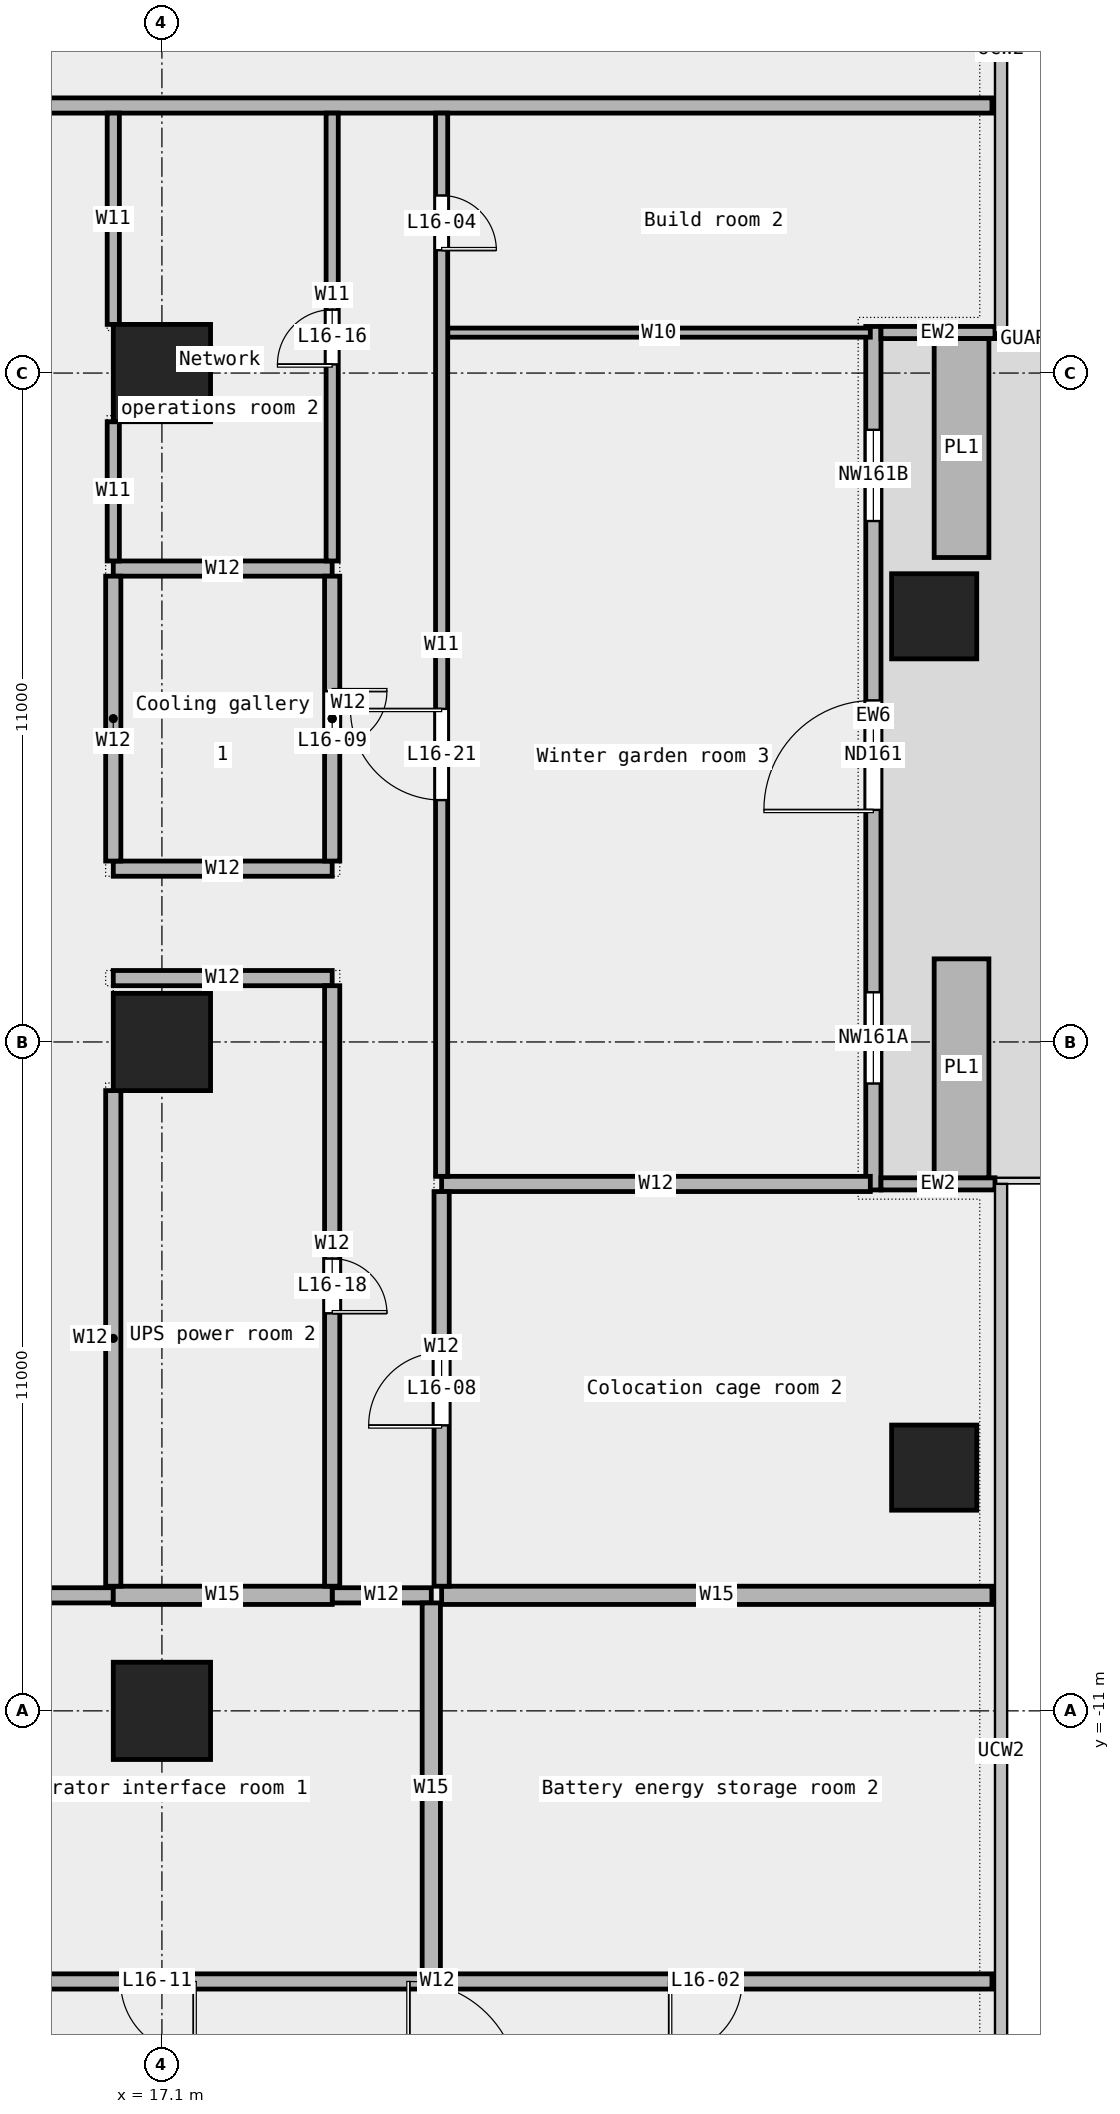
"""IFC4 building model, lengths in metres.
Left out: names, types, materials, properties, quantities, classifications, styles, units other than length and angle.
Written with IfcOpenShell. Run it as: python <this file> out.ifc"""

import sys

from ifc_helpers import new_model, si_unit, direction, frame, frame_2d, origin, origin_2d, place, context, subcontext, project, spatial, rectangle, extrude, element, fill, save


model = new_model("IFC4")
c1 = context("Model", 3, precision=1e-05, world=origin(), true_north=direction((0.0, 1.0)))
c2 = subcontext(c1, "Body", "Model", "MODEL_VIEW")
j1 = project(units=[si_unit("LENGTHUNIT", "METRE"), si_unit("PLANEANGLEUNIT", "RADIAN")], contexts=[c1])
p1 = place(None, origin())
s1 = spatial("IfcSite", under=j1, at=p1, CompositionType="ELEMENT")
p2 = place(p1, origin())
s2 = spatial("IfcBuilding", under=s1, at=p2, CompositionType="ELEMENT")
p3 = place(p2, frame((0.0, 0.0, 83.8)))
s3 = spatial("IfcBuildingStorey", under=s2, at=p3, CompositionType="ELEMENT", Elevation=83.8)
for number, where, z_axis, x_axis in (
    (1, (29.8, -7.0, 0.0), (0.0, 0.0, 1.0), (1.0, 0.0, 0.0)),
    (2, (29.8, 7.0, 0.0), (0.0, 0.0, 1.0), (1.0, 0.0, 0.0)),
):
    element("IfcColumn", number, at=place(p3, frame(where, z_axis=z_axis, x_axis=x_axis)), inside=s3, PredefinedType="COLUMN", context=c2, shape_type="SweptSolid", body=[
        extrude(rectangle(XDim=1.4, YDim=1.4, at=origin_2d()), origin(), (0.0, 0.0, 1.0), 4.2),
    ])
for number, where, z_axis, x_axis in (
    (3, (17.1, -11.0, 0.0), (0.0, 0.0, 1.0), (1.0, 0.0, 0.0)),
    (4, (17.1, 0.0, 0.0), (0.0, 0.0, 1.0), (1.0, 0.0, 0.0)),
    (5, (17.1, 11.0, 0.0), (0.0, 0.0, 1.0), (1.0, 0.0, 0.0)),
):
    element("IfcColumn", number, at=place(p3, frame(where, z_axis=z_axis, x_axis=x_axis)), inside=s3, PredefinedType="COLUMN", context=c2, shape_type="SweptSolid", body=[
        extrude(rectangle(XDim=1.6, YDim=1.6, at=origin_2d()), origin(), (0.0, 0.0, 1.0), 4.2),
    ])
p4 = place(p3, frame((28.8, -2.433, 0.0), z_axis=(0.0, 0.0, 1.0), x_axis=(0.0, 1.0, 0.0)))
e6 = element("IfcWall", 6, at=p4, inside=s3, PredefinedType="STANDARD", context=c2, shape_type="SweptSolid", body=[
    extrude(rectangle(XDim=14.2, YDim=0.25, at=frame_2d((7.1, 0.0))), origin(), (0.0, 0.0, 1.0), 4.2),
])
p5 = place(p4, frame((1.75, 0.0, 0.45)))
e7 = element("IfcOpeningElement", 7, at=p5, cuts=e6, PredefinedType="OPENING", context=c2, shape_type="SweptSolid", body=[
    extrude(rectangle(XDim=1.5, YDim=3.0, at=frame_2d((0.75, 1.5))), frame((0.0, 0.137, 0.0), z_axis=(0.0, -1.0, 0.0), x_axis=(1.0, 0.0, 0.0)), (0.0, 0.0, 1.0), 0.274),
])
p6 = place(p4, frame((6.25, 0.0, 0.0)))
e8 = element("IfcOpeningElement", 8, at=p6, cuts=e6, PredefinedType="OPENING", context=c2, shape_type="SweptSolid", body=[
    extrude(rectangle(XDim=1.8, YDim=2.4, at=frame_2d((0.9, 1.2))), frame((0.0, 0.137, 0.0), z_axis=(0.0, -1.0, 0.0), x_axis=(1.0, 0.0, 0.0)), (0.0, 0.0, 1.0), 0.274),
])
p7 = place(p4, frame((11.0, 0.0, 0.45)))
e9 = element("IfcOpeningElement", 9, at=p7, cuts=e6, PredefinedType="OPENING", context=c2, shape_type="SweptSolid", body=[
    extrude(rectangle(XDim=1.5, YDim=3.0, at=frame_2d((0.75, 1.5))), frame((0.0, 0.137, 0.0), z_axis=(0.0, -1.0, 0.0), x_axis=(1.0, 0.0, 0.0)), (0.0, 0.0, 1.0), 0.274),
])
for number, where, z_axis, x_axis in (
    (10, (30.8, -2.333, 0.0), (0.0, 0.0, 1.0), (-1.0, 0.0, 0.0)),
    (11, (30.8, 11.667, 0.0), (0.0, 0.0, 1.0), (-1.0, 0.0, 0.0)),
):
    element("IfcWall", number, at=place(p3, frame(where, z_axis=z_axis, x_axis=x_axis)), inside=s3, PredefinedType="STANDARD", context=c2, shape_type="SweptSolid", body=[
        extrude(rectangle(XDim=1.875, YDim=0.2, at=frame_2d((0.938, 0.0))), origin(), (0.0, 0.0, 1.0), 4.2),
    ])
for number, where, z_axis, x_axis in (
    (12, (30.25, -2.233, 0.0), (0.0, 0.0, 1.0), (0.0, 1.0, 0.0)),
    (13, (30.25, 7.967, 0.0), (0.0, 0.0, 1.0), (0.0, 1.0, 0.0)),
):
    element("IfcWall", number, at=place(p3, frame(where, z_axis=z_axis, x_axis=x_axis)), inside=s3, PredefinedType="STANDARD", context=c2, shape_type="SweptSolid", body=[
        extrude(rectangle(XDim=3.6, YDim=0.9, at=frame_2d((1.8, 0.0))), origin(), (0.0, 0.0, 1.0), 0.7),
    ])
p8 = place(p3, frame((12.51, -15.45, 0.0), z_axis=(0.0, 0.0, 1.0), x_axis=(1.0, 0.0, 0.0)))
e14 = element("IfcWall", 14, at=p8, inside=s3, PredefinedType="PARTITIONING", context=c2, shape_type="SweptSolid", body=[
    extrude(rectangle(XDim=18.24, YDim=0.25, at=frame_2d((9.12, 0.0))), origin(), (0.0, 0.0, 1.0), 4.2),
])
p9 = place(p8, frame((12.93, 0.0, 0.0)))
e15 = element("IfcOpeningElement", 15, at=p9, cuts=e14, PredefinedType="OPENING", context=c2, shape_type="SweptSolid", body=[
    extrude(rectangle(XDim=1.2, YDim=2.1, at=frame_2d((0.6, 1.05))), frame((0.0, 0.137, 0.0), z_axis=(0.0, -1.0, 0.0), x_axis=(1.0, 0.0, 0.0)), (0.0, 0.0, 1.0), 0.274),
])
p10 = place(p8, frame((3.91, 0.0, 0.0)))
e16 = element("IfcOpeningElement", 16, at=p10, cuts=e14, PredefinedType="OPENING", context=c2, shape_type="SweptSolid", body=[
    extrude(rectangle(XDim=1.2, YDim=2.1, at=frame_2d((0.6, 1.05))), frame((0.0, 0.137, 0.0), z_axis=(0.0, -1.0, 0.0), x_axis=(1.0, 0.0, 0.0)), (0.0, 0.0, 1.0), 0.274),
])
p11 = place(p3, frame((12.51, -9.1, 0.0), z_axis=(0.0, 0.0, 1.0), x_axis=(1.0, 0.0, 0.0)))
e17 = element("IfcWall", 17, at=p11, inside=s3, PredefinedType="PARTITIONING", context=c2, shape_type="SweptSolid", body=[
    extrude(rectangle(XDim=3.79, YDim=0.25, at=frame_2d((1.895, 0.0))), origin(), (0.0, 0.0, 1.0), 4.2),
])
p12 = place(p3, frame((19.9, -9.1, 0.0), z_axis=(0.0, 0.0, 1.0), x_axis=(1.0, 0.0, 0.0)))
e18 = element("IfcWall", 18, at=p12, inside=s3, PredefinedType="PARTITIONING", context=c2, shape_type="SweptSolid", body=[
    extrude(rectangle(XDim=1.63, YDim=0.25, at=frame_2d((0.815, 0.0))), origin(), (0.0, 0.0, 1.0), 4.2),
])
p13 = place(p3, frame((16.3, -9.1, 0.0), z_axis=(0.0, 0.0, 1.0), x_axis=(1.0, 0.0, 0.0)))
e19 = element("IfcWall", 19, at=p13, inside=s3, PredefinedType="PARTITIONING", context=c2, shape_type="SweptSolid", body=[
    extrude(rectangle(XDim=3.6, YDim=0.3, at=frame_2d((1.8, 0.0))), origin(), (0.0, 0.0, 1.0), 4.2),
])
p14 = place(p3, frame((21.7, -9.1, 0.0), z_axis=(0.0, 0.0, 1.0), x_axis=(1.0, 0.0, 0.0)))
e20 = element("IfcWall", 20, at=p14, inside=s3, PredefinedType="PARTITIONING", context=c2, shape_type="SweptSolid", body=[
    extrude(rectangle(XDim=9.05, YDim=0.3, at=frame_2d((4.525, 0.0))), origin(), (0.0, 0.0, 1.0), 4.2),
])
p15 = place(p3, frame((21.7, -2.335, 0.0), z_axis=(0.0, 0.0, 1.0), x_axis=(1.0, 0.0, 0.0)))
e21 = element("IfcWall", 21, at=p15, inside=s3, PredefinedType="PARTITIONING", context=c2, shape_type="SweptSolid", body=[
    extrude(rectangle(XDim=7.05, YDim=0.25, at=frame_2d((3.525, 0.0))), origin(), (0.0, 0.0, 1.0), 4.2),
])
for number, where, z_axis, x_axis in (
    (22, (16.3, 1.05, 0.0), (0.0, 0.0, 1.0), (1.0, 0.0, 0.0)),
    (23, (16.3, 2.85, 0.0), (0.0, 0.0, 1.0), (1.0, 0.0, 0.0)),
    (24, (16.3, 7.785, 0.0), (0.0, 0.0, 1.0), (1.0, 0.0, 0.0)),
):
    element("IfcWall", number, at=place(p3, frame(where, z_axis=z_axis, x_axis=x_axis)), inside=s3, PredefinedType="PARTITIONING", context=c2, shape_type="SweptSolid", body=[
        extrude(rectangle(XDim=3.6, YDim=0.25, at=frame_2d((1.8, 0.0))), origin(), (0.0, 0.0, 1.0), 4.2),
    ])
p16 = place(p3, frame((21.8, 11.665, 0.0), z_axis=(0.0, 0.0, 1.0), x_axis=(1.0, 0.0, 0.0)))
e25 = element("IfcWall", 25, at=p16, inside=s3, PredefinedType="PARTITIONING", context=c2, shape_type="SweptSolid", body=[
    extrude(rectangle(XDim=6.95, YDim=0.15, at=frame_2d((3.475, 0.0))), origin(), (0.0, 0.0, 1.0), 4.2),
])
p17 = place(p3, frame((-2.255, 15.4, 0.0), z_axis=(0.0, 0.0, 1.0), x_axis=(1.0, 0.0, 0.0)))
e26 = element("IfcWall", 26, at=p17, inside=s3, PredefinedType="PARTITIONING", context=c2, shape_type="SweptSolid", body=[
    extrude(rectangle(XDim=33.005, YDim=0.25, at=frame_2d((16.502, 0.0))), origin(), (0.0, 0.0, 1.0), 4.2),
])
p18 = place(p17, frame((11.498, 0.0, 0.0)))
e27 = element("IfcOpeningElement", 27, at=p18, cuts=e26, PredefinedType="OPENING", context=c2, shape_type="SweptSolid", body=[
    extrude(rectangle(XDim=1.8, YDim=2.1, at=frame_2d((0.9, 1.05))), frame((0.0, 0.137, 0.0), z_axis=(0.0, -1.0, 0.0), x_axis=(1.0, 0.0, 0.0)), (0.0, 0.0, 1.0), 0.274),
])
p19 = place(p17, frame((2.52, 0.0, 0.0)))
e28 = element("IfcOpeningElement", 28, at=p19, cuts=e26, PredefinedType="OPENING", context=c2, shape_type="SweptSolid", body=[
    extrude(rectangle(XDim=1.2, YDim=2.1, at=frame_2d((0.6, 1.05))), frame((0.0, 0.137, 0.0), z_axis=(0.0, -1.0, 0.0), x_axis=(1.0, 0.0, 0.0)), (0.0, 0.0, 1.0), 0.274),
])
p20 = place(p3, frame((16.3, 7.91, 0.0), z_axis=(0.0, 0.0, 1.0), x_axis=(0.0, 1.0, 0.0)))
e29 = element("IfcWall", 29, at=p20, inside=s3, PredefinedType="PARTITIONING", context=c2, shape_type="SweptSolid", body=[
    extrude(rectangle(XDim=2.29, YDim=0.2, at=frame_2d((1.145, 0.0))), origin(), (0.0, 0.0, 1.0), 4.2),
])
p21 = place(p3, frame((16.3, 11.8, 0.0), z_axis=(0.0, 0.0, 1.0), x_axis=(0.0, 1.0, 0.0)))
e30 = element("IfcWall", 30, at=p21, inside=s3, PredefinedType="PARTITIONING", context=c2, shape_type="SweptSolid", body=[
    extrude(rectangle(XDim=3.475, YDim=0.2, at=frame_2d((1.737, 0.0))), origin(), (0.0, 0.0, 1.0), 4.2),
])
p22 = place(p3, frame((16.3, -8.95, 0.0), z_axis=(0.0, 0.0, 1.0), x_axis=(0.0, 1.0, 0.0)))
e31 = element("IfcWall", 31, at=p22, inside=s3, PredefinedType="PARTITIONING", context=c2, shape_type="SweptSolid", body=[
    extrude(rectangle(XDim=8.15, YDim=0.25, at=frame_2d((4.075, 0.0))), origin(), (0.0, 0.0, 1.0), 4.2),
])
p23 = place(p3, frame((16.3, 2.975, 0.0), z_axis=(0.0, 0.0, 1.0), x_axis=(0.0, 1.0, 0.0)))
e32 = element("IfcWall", 32, at=p23, inside=s3, PredefinedType="PARTITIONING", context=c2, shape_type="SweptSolid", body=[
    extrude(rectangle(XDim=4.685, YDim=0.25, at=frame_2d((2.342, 0.0))), origin(), (0.0, 0.0, 1.0), 4.2),
])
p24 = place(p3, frame((19.9, 7.91, 0.0), z_axis=(0.0, 0.0, 1.0), x_axis=(0.0, 1.0, 0.0)))
e33 = element("IfcWall", 33, at=p24, inside=s3, PredefinedType="PARTITIONING", context=c2, shape_type="SweptSolid", body=[
    extrude(rectangle(XDim=7.365, YDim=0.2, at=frame_2d((3.683, 0.0))), origin(), (0.0, 0.0, 1.0), 4.2),
])
p25 = place(p24, frame((3.232, 0.0, 0.0)))
e34 = element("IfcOpeningElement", 34, at=p25, cuts=e33, PredefinedType="OPENING", context=c2, shape_type="SweptSolid", body=[
    extrude(rectangle(XDim=0.9, YDim=2.1, at=frame_2d((0.45, 1.05))), frame((0.0, 0.112, 0.0), z_axis=(0.0, -1.0, 0.0), x_axis=(1.0, 0.0, 0.0)), (0.0, 0.0, 1.0), 0.224),
])
p26 = place(p3, frame((19.9, -8.95, 0.0), z_axis=(0.0, 0.0, 1.0), x_axis=(0.0, 1.0, 0.0)))
e35 = element("IfcWall", 35, at=p26, inside=s3, PredefinedType="PARTITIONING", context=c2, shape_type="SweptSolid", body=[
    extrude(rectangle(XDim=9.875, YDim=0.25, at=frame_2d((4.938, 0.0))), origin(), (0.0, 0.0, 1.0), 4.2),
])
p27 = place(p26, frame((4.488, 0.0, 0.0)))
e36 = element("IfcOpeningElement", 36, at=p27, cuts=e35, PredefinedType="OPENING", context=c2, shape_type="SweptSolid", body=[
    extrude(rectangle(XDim=0.9, YDim=2.1, at=frame_2d((0.45, 1.05))), frame((0.0, 0.137, 0.0), z_axis=(0.0, -1.0, 0.0), x_axis=(1.0, 0.0, 0.0)), (0.0, 0.0, 1.0), 0.274),
])
p28 = place(p3, frame((19.9, 2.975, 0.0), z_axis=(0.0, 0.0, 1.0), x_axis=(0.0, 1.0, 0.0)))
e37 = element("IfcWall", 37, at=p28, inside=s3, PredefinedType="PARTITIONING", context=c2, shape_type="SweptSolid", body=[
    extrude(rectangle(XDim=4.685, YDim=0.25, at=frame_2d((2.342, 0.0))), origin(), (0.0, 0.0, 1.0), 4.2),
])
p29 = place(p28, frame((1.893, 0.0, 0.0)))
e38 = element("IfcOpeningElement", 38, at=p29, cuts=e37, PredefinedType="OPENING", context=c2, shape_type="SweptSolid", body=[
    extrude(rectangle(XDim=0.9, YDim=2.1, at=frame_2d((0.45, 1.05))), frame((0.0, 0.137, 0.0), z_axis=(0.0, -1.0, 0.0), x_axis=(1.0, 0.0, 0.0)), (0.0, 0.0, 1.0), 0.274),
])
p30 = place(p3, frame((21.53, -15.325, 0.0), z_axis=(0.0, 0.0, 1.0), x_axis=(0.0, 1.0, 0.0)))
e39 = element("IfcWall", 39, at=p30, inside=s3, PredefinedType="PARTITIONING", context=c2, shape_type="SweptSolid", body=[
    extrude(rectangle(XDim=6.1, YDim=0.3, at=frame_2d((3.05, 0.0))), origin(), (0.0, 0.0, 1.0), 4.2),
])
p31 = place(p3, frame((21.7, -2.21, 0.0), z_axis=(0.0, 0.0, 1.0), x_axis=(0.0, 1.0, 0.0)))
e40 = element("IfcWall", 40, at=p31, inside=s3, PredefinedType="PARTITIONING", context=c2, shape_type="SweptSolid", body=[
    extrude(rectangle(XDim=17.485, YDim=0.2, at=frame_2d((8.742, 0.0))), origin(), (0.0, 0.0, 1.0), 4.2),
])
p32 = place(p31, frame((15.23, 0.0, 0.0)))
e41 = element("IfcOpeningElement", 41, at=p32, cuts=e40, PredefinedType="OPENING", context=c2, shape_type="SweptSolid", body=[
    extrude(rectangle(XDim=0.9, YDim=2.1, at=frame_2d((0.45, 1.05))), frame((0.0, 0.112, 0.0), z_axis=(0.0, -1.0, 0.0), x_axis=(1.0, 0.0, 0.0)), (0.0, 0.0, 1.0), 0.224),
])
p33 = place(p31, frame((6.188, 0.0, 0.0)))
e42 = element("IfcOpeningElement", 42, at=p33, cuts=e40, PredefinedType="OPENING", context=c2, shape_type="SweptSolid", body=[
    extrude(rectangle(XDim=1.5, YDim=2.1, at=frame_2d((0.75, 1.05))), frame((0.0, 0.112, 0.0), z_axis=(0.0, -1.0, 0.0), x_axis=(1.0, 0.0, 0.0)), (0.0, 0.0, 1.0), 0.224),
])
p34 = place(p3, frame((21.7, -8.95, 0.0), z_axis=(0.0, 0.0, 1.0), x_axis=(0.0, 1.0, 0.0)))
e43 = element("IfcWall", 43, at=p34, inside=s3, PredefinedType="PARTITIONING", context=c2, shape_type="SweptSolid", body=[
    extrude(rectangle(XDim=6.49, YDim=0.25, at=frame_2d((3.245, 0.0))), origin(), (0.0, 0.0, 1.0), 4.2),
])
p35 = place(p34, frame((2.645, 0.0, 0.0)))
e44 = element("IfcOpeningElement", 44, at=p35, cuts=e43, PredefinedType="OPENING", context=c2, shape_type="SweptSolid", body=[
    extrude(rectangle(XDim=1.2, YDim=2.1, at=frame_2d((0.6, 1.05))), frame((0.0, 0.137, 0.0), z_axis=(0.0, -1.0, 0.0), x_axis=(1.0, 0.0, 0.0)), (0.0, 0.0, 1.0), 0.274),
])
p36 = place(p5, origin())
e45 = element("IfcWindow", 45, at=p36, inside=s3, PartitioningType="SINGLE_PANEL", PredefinedType="WINDOW", context=c2, shape_type="SweptSolid", body=[
    extrude(rectangle(XDim=1.5, YDim=3.0, at=frame_2d((0.75, 1.5))), frame((0.0, 0.03, 0.0), z_axis=(0.0, -1.0, 0.0), x_axis=(1.0, 0.0, 0.0)), (0.0, 0.0, 1.0), 0.06),
])
fill(e7, e45)
p37 = place(p6, origin())
e46 = element("IfcDoor", 46, at=p37, inside=s3, OperationType="DOUBLE_DOOR_SINGLE_SWING", PredefinedType="DOOR", context=c2, shape_type="SweptSolid", body=[
    extrude(rectangle(XDim=1.8, YDim=2.4, at=frame_2d((0.9, 1.2))), frame((0.0, 0.025, 0.0), z_axis=(0.0, -1.0, 0.0), x_axis=(1.0, 0.0, 0.0)), (0.0, 0.0, 1.0), 0.05),
])
fill(e8, e46)
p38 = place(p7, origin())
e47 = element("IfcWindow", 47, at=p38, inside=s3, PartitioningType="SINGLE_PANEL", PredefinedType="WINDOW", context=c2, shape_type="SweptSolid", body=[
    extrude(rectangle(XDim=1.5, YDim=3.0, at=frame_2d((0.75, 1.5))), frame((0.0, 0.03, 0.0), z_axis=(0.0, -1.0, 0.0), x_axis=(1.0, 0.0, 0.0)), (0.0, 0.0, 1.0), 0.06),
])
fill(e9, e47)
p39 = place(p9, origin())
e48 = element("IfcDoor", 48, at=p39, inside=s3, OperationType="SINGLE_SWING_RIGHT", PredefinedType="DOOR", context=c2, shape_type="SweptSolid", body=[
    extrude(rectangle(XDim=1.2, YDim=2.1, at=frame_2d((0.6, 1.05))), frame((0.0, 0.025, 0.0), z_axis=(0.0, -1.0, 0.0), x_axis=(1.0, 0.0, 0.0)), (0.0, 0.0, 1.0), 0.05),
])
fill(e15, e48)
p40 = place(p32, origin())
e49 = element("IfcDoor", 49, at=p40, inside=s3, OperationType="SINGLE_SWING_RIGHT", PredefinedType="DOOR", context=c2, shape_type="SweptSolid", body=[
    extrude(rectangle(XDim=0.9, YDim=2.1, at=frame_2d((0.45, 1.05))), frame((0.0, 0.025, 0.0), z_axis=(0.0, -1.0, 0.0), x_axis=(1.0, 0.0, 0.0)), (0.0, 0.0, 1.0), 0.05),
])
fill(e41, e49)
p41 = place(p35, origin())
e50 = element("IfcDoor", 50, at=p41, inside=s3, OperationType="SINGLE_SWING_LEFT", PredefinedType="DOOR", context=c2, shape_type="SweptSolid", body=[
    extrude(rectangle(XDim=1.2, YDim=2.1, at=frame_2d((0.6, 1.05))), frame((0.0, 0.025, 0.0), z_axis=(0.0, -1.0, 0.0), x_axis=(1.0, 0.0, 0.0)), (0.0, 0.0, 1.0), 0.05),
])
fill(e44, e50)
p42 = place(p29, origin())
e51 = element("IfcDoor", 51, at=p42, inside=s3, OperationType="SINGLE_SWING_LEFT", PredefinedType="DOOR", context=c2, shape_type="SweptSolid", body=[
    extrude(rectangle(XDim=0.9, YDim=2.1, at=frame_2d((0.45, 1.05))), frame((0.0, 0.025, 0.0), z_axis=(0.0, -1.0, 0.0), x_axis=(1.0, 0.0, 0.0)), (0.0, 0.0, 1.0), 0.05),
])
fill(e38, e51)
p43 = place(p10, origin())
e52 = element("IfcDoor", 52, at=p43, inside=s3, OperationType="SINGLE_SWING_LEFT", PredefinedType="DOOR", context=c2, shape_type="SweptSolid", body=[
    extrude(rectangle(XDim=1.2, YDim=2.1, at=frame_2d((0.6, 1.05))), frame((0.0, 0.025, 0.0), z_axis=(0.0, -1.0, 0.0), x_axis=(1.0, 0.0, 0.0)), (0.0, 0.0, 1.0), 0.05),
])
fill(e16, e52)
p44 = place(p25, origin())
e53 = element("IfcDoor", 53, at=p44, inside=s3, OperationType="SINGLE_SWING_LEFT", PredefinedType="DOOR", context=c2, shape_type="SweptSolid", body=[
    extrude(rectangle(XDim=0.9, YDim=2.1, at=frame_2d((0.45, 1.05))), frame((0.0, 0.025, 0.0), z_axis=(0.0, -1.0, 0.0), x_axis=(1.0, 0.0, 0.0)), (0.0, 0.0, 1.0), 0.05),
])
fill(e34, e53)
p45 = place(p27, origin())
e54 = element("IfcDoor", 54, at=p45, inside=s3, OperationType="SINGLE_SWING_RIGHT", PredefinedType="DOOR", context=c2, shape_type="SweptSolid", body=[
    extrude(rectangle(XDim=0.9, YDim=2.1, at=frame_2d((0.45, 1.05))), frame((0.0, 0.025, 0.0), z_axis=(0.0, -1.0, 0.0), x_axis=(1.0, 0.0, 0.0)), (0.0, 0.0, 1.0), 0.05),
])
fill(e36, e54)
p46 = place(p33, origin())
e55 = element("IfcDoor", 55, at=p46, inside=s3, OperationType="DOUBLE_DOOR_SINGLE_SWING", PredefinedType="DOOR", context=c2, shape_type="SweptSolid", body=[
    extrude(rectangle(XDim=1.5, YDim=2.1, at=frame_2d((0.75, 1.05))), frame((0.0, 0.025, 0.0), z_axis=(0.0, -1.0, 0.0), x_axis=(1.0, 0.0, 0.0)), (0.0, 0.0, 1.0), 0.05),
])
fill(e42, e55)
save(model, sys.argv[1])
